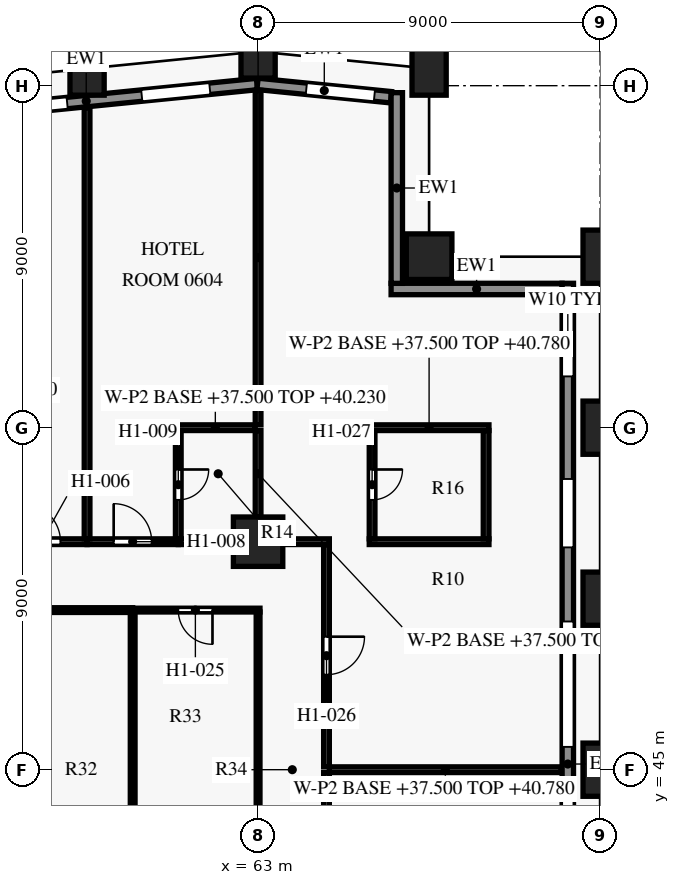
"""IFC4 building model, lengths in metres.
Left out: names, types, materials, properties, quantities, classifications, styles, units other than length and angle.
Written with IfcOpenShell. Run it as: python <this file> out.ifc"""

import sys

from ifc_helpers import new_model, si_unit, direction, frame, frame_2d, origin, origin_2d, place, context, subcontext, project, spatial, rectangle, extrude, element, fill, save


model = new_model("IFC4")
c1 = context("Model", 3, precision=1e-05, world=origin(), true_north=direction((0.0, 1.0)))
c2 = subcontext(c1, "Body", "Model", "MODEL_VIEW")
j1 = project(units=[si_unit("LENGTHUNIT", "METRE"), si_unit("PLANEANGLEUNIT", "RADIAN")], contexts=[c1])
p1 = place(None, origin())
s1 = spatial("IfcSite", under=j1, at=p1, CompositionType="ELEMENT")
p2 = place(p1, origin())
s2 = spatial("IfcBuilding", under=s1, at=p2, CompositionType="ELEMENT")
p3 = place(p2, frame((0.0, 0.0, 37.5)))
s3 = spatial("IfcBuildingStorey", under=s2, at=p3, CompositionType="ELEMENT", Elevation=37.5)
for number, where, z_axis, x_axis in (
    (1, (72.0, 45.0, 0.0), (0.0, 0.0, 1.0), (0.0, 1.0, 0.0)),
    (2, (72.0, 49.5, 0.0), (0.0, 0.0, 1.0), (0.0, 1.0, 0.0)),
    (3, (72.0, 54.0, 0.0), (0.0, 0.0, 1.0), (0.0, 1.0, 0.0)),
    (4, (72.0, 58.5, 0.0), (0.0, 0.0, 1.0), (0.0, 1.0, 0.0)),
    (5, (67.5, 63.45, 0.0), (0.0, 0.0, 1.0), (-0.995, 0.1, 0.0)),
    (6, (63.0, 63.9, 0.0), (0.0, 0.0, 1.0), (-1.0, 0.0, 0.0)),
    (7, (58.5, 63.45, 0.0), (0.0, 0.0, 1.0), (-0.995, -0.1, 0.0)),
):
    element("IfcColumn", number, at=place(p3, frame(where, z_axis=z_axis, x_axis=x_axis)), inside=s3, PredefinedType="COLUMN", context=c2, shape_type="SweptSolid", body=[
        extrude(rectangle(XDim=0.9, YDim=1.4, at=origin_2d()), origin(), (0.0, 0.0, 1.0), 3.6),
    ])
p4 = place(p3, frame((67.5, 58.5, 0.0), z_axis=(0.0, 0.0, 1.0), x_axis=(1.0, 0.0, 0.0)))
e8 = element("IfcColumn", 8, at=p4, inside=s3, PredefinedType="COLUMN", context=c2, shape_type="SweptSolid", body=[
    extrude(rectangle(XDim=1.2, YDim=1.2, at=origin_2d()), origin(), (0.0, 0.0, 1.0), 3.6),
])
p5 = place(p3, frame((63.0, 51.0, 0.0), z_axis=(0.0, 0.0, 1.0), x_axis=(1.0, 0.0, 0.0)))
e9 = element("IfcColumn", 9, at=p5, inside=s3, PredefinedType="COLUMN", context=c2, shape_type="SweptSolid", body=[
    extrude(rectangle(XDim=1.3, YDim=1.3, at=origin_2d()), origin(), (0.0, 0.0, 1.0), 3.6),
])
p6 = place(p3, frame((71.15, 57.8, 0.0), z_axis=(0.0, 0.0, 1.0), x_axis=(0.0, -1.0, 0.0)))
e10 = element("IfcWall", 10, at=p6, inside=s3, PredefinedType="SOLIDWALL", context=c2, shape_type="SweptSolid", body=[
    extrude(rectangle(XDim=25.302, YDim=0.3, at=frame_2d((12.651, 0.0))), origin(), (0.0, 0.0, 1.0), 2.95),
])
p7 = place(p6, frame((0.65, 0.0, 0.75)))
e11 = element("IfcOpeningElement", 11, at=p7, cuts=e10, PredefinedType="OPENING", context=c2, shape_type="SweptSolid", body=[
    extrude(rectangle(XDim=1.8, YDim=1.8, at=frame_2d((0.9, 0.9))), frame((0.0, 0.16, 0.0), z_axis=(0.0, -1.0, 0.0), x_axis=(1.0, 0.0, 0.0)), (0.0, 0.0, 1.0), 0.32),
])
p8 = place(p6, frame((5.15, 0.0, 0.75)))
e12 = element("IfcOpeningElement", 12, at=p8, cuts=e10, PredefinedType="OPENING", context=c2, shape_type="SweptSolid", body=[
    extrude(rectangle(XDim=1.8, YDim=1.8, at=frame_2d((0.9, 0.9))), frame((0.0, 0.16, 0.0), z_axis=(0.0, -1.0, 0.0), x_axis=(1.0, 0.0, 0.0)), (0.0, 0.0, 1.0), 0.32),
])
p9 = place(p6, frame((8.9, 0.0, 0.15)))
e13 = element("IfcOpeningElement", 13, at=p9, cuts=e10, PredefinedType="OPENING", context=c2, shape_type="SweptSolid", body=[
    extrude(rectangle(XDim=3.3, YDim=2.4, at=frame_2d((1.65, 1.2))), frame((0.0, 0.16, 0.0), z_axis=(0.0, -1.0, 0.0), x_axis=(1.0, 0.0, 0.0)), (0.0, 0.0, 1.0), 0.32),
])
p10 = place(p6, frame((13.4, 0.0, 0.15)))
e14 = element("IfcOpeningElement", 14, at=p10, cuts=e10, PredefinedType="OPENING", context=c2, shape_type="SweptSolid", body=[
    extrude(rectangle(XDim=3.3, YDim=2.4, at=frame_2d((1.65, 1.2))), frame((0.0, 0.16, 0.0), z_axis=(0.0, -1.0, 0.0), x_axis=(1.0, 0.0, 0.0)), (0.0, 0.0, 1.0), 0.32),
])
p11 = place(p6, frame((18.65, 0.0, 0.75)))
e15 = element("IfcOpeningElement", 15, at=p11, cuts=e10, PredefinedType="OPENING", context=c2, shape_type="SweptSolid", body=[
    extrude(rectangle(XDim=1.8, YDim=1.8, at=frame_2d((0.9, 0.9))), frame((0.0, 0.16, 0.0), z_axis=(0.0, -1.0, 0.0), x_axis=(1.0, 0.0, 0.0)), (0.0, 0.0, 1.0), 0.32),
])
p12 = place(p6, frame((23.15, 0.0, 0.75)))
e16 = element("IfcOpeningElement", 16, at=p12, cuts=e10, PredefinedType="OPENING", context=c2, shape_type="SweptSolid", body=[
    extrude(rectangle(XDim=1.8, YDim=1.8, at=frame_2d((0.9, 0.9))), frame((0.0, 0.16, 0.0), z_axis=(0.0, -1.0, 0.0), x_axis=(1.0, 0.0, 0.0)), (0.0, 0.0, 1.0), 0.32),
])
p13 = place(p3, frame((66.5, 57.65, 0.0), z_axis=(0.0, 0.0, 1.0), x_axis=(1.0, 0.0, 0.0)))
e17 = element("IfcWall", 17, at=p13, inside=s3, PredefinedType="SOLIDWALL", context=c2, shape_type="SweptSolid", body=[
    extrude(rectangle(XDim=4.5, YDim=0.3, at=frame_2d((2.25, 0.0))), origin(), (0.0, 0.0, 1.0), 2.95),
])
p14 = place(p3, frame((66.65, 62.816, 0.0), z_axis=(0.0, 0.0, 1.0), x_axis=(0.0, -1.0, 0.0)))
e18 = element("IfcWall", 18, at=p14, inside=s3, PredefinedType="SOLIDWALL", context=c2, shape_type="SweptSolid", body=[
    extrude(rectangle(XDim=5.018, YDim=0.3, at=frame_2d((2.509, 0.0))), origin(), (0.0, 0.0, 1.0), 2.95),
])
p15 = place(p3, frame((62.985, 63.047, 0.0), z_axis=(0.0, 0.0, 1.0), x_axis=(0.995031712439, -0.099558481511, 0.0)))
e19 = element("IfcWall", 19, at=p15, inside=s3, PredefinedType="SOLIDWALL", context=c2, shape_type="SweptSolid", body=[
    extrude(rectangle(XDim=3.531, YDim=0.3, at=frame_2d((1.766, 0.0))), origin(), (0.0, 0.0, 1.0), 2.95),
])
p16 = place(p15, frame((1.291, 0.0, 0.75)))
e20 = element("IfcOpeningElement", 20, at=p16, cuts=e19, PredefinedType="OPENING", context=c2, shape_type="SweptSolid", body=[
    extrude(rectangle(XDim=1.8, YDim=1.8, at=frame_2d((0.9, 0.9))), frame((0.0, 0.16, 0.0), z_axis=(0.0, -1.0, 0.0), x_axis=(1.0, 0.0, 0.0)), (0.0, 0.0, 1.0), 0.32),
])
p17 = place(p3, frame((53.985, 62.144, 0.0), z_axis=(0.0, 0.0, 1.0), x_axis=(0.995037993253, 0.099495688264, 0.0)))
e21 = element("IfcWall", 21, at=p17, inside=s3, PredefinedType="SOLIDWALL", context=c2, shape_type="SweptSolid", body=[
    extrude(rectangle(XDim=9.03, YDim=0.3, at=frame_2d((4.515, 0.0))), origin(), (0.0, 0.0, 1.0), 2.95),
])
p18 = place(p17, frame((0.711, 0.0, 0.15)))
e22 = element("IfcOpeningElement", 22, at=p18, cuts=e21, PredefinedType="OPENING", context=c2, shape_type="SweptSolid", body=[
    extrude(rectangle(XDim=3.3, YDim=2.4, at=frame_2d((1.65, 1.2))), frame((0.0, 0.16, 0.0), z_axis=(0.0, -1.0, 0.0), x_axis=(1.0, 0.0, 0.0)), (0.0, 0.0, 1.0), 0.32),
])
p19 = place(p17, frame((5.984, 0.0, 0.75)))
e23 = element("IfcOpeningElement", 23, at=p19, cuts=e21, PredefinedType="OPENING", context=c2, shape_type="SweptSolid", body=[
    extrude(rectangle(XDim=1.8, YDim=1.8, at=frame_2d((0.9, 0.9))), frame((0.0, 0.16, 0.0), z_axis=(0.0, -1.0, 0.0), x_axis=(1.0, 0.0, 0.0)), (0.0, 0.0, 1.0), 0.32),
])
p20 = place(p3, frame((63.0, 40.85, 0.0), z_axis=(0.0, 0.0, 1.0), x_axis=(0.0, 1.0, 0.0)))
e24 = element("IfcWall", 24, at=p20, inside=s3, PredefinedType="PARTITIONING", context=c2, shape_type="SweptSolid", body=[
    extrude(rectangle(XDim=8.3, YDim=0.1, at=frame_2d((4.15, 0.0))), origin(), (0.0, 0.0, 1.0), 2.73),
])
p21 = place(p3, frame((64.8, 44.925, 0.0), z_axis=(0.0, 0.0, 1.0), x_axis=(0.0, -1.0, 0.0)))
e25 = element("IfcWall", 25, at=p21, inside=s3, PredefinedType="PARTITIONING", context=c2, shape_type="SweptSolid", body=[
    extrude(rectangle(XDim=5.85, YDim=0.15, at=frame_2d((2.925, 0.0))), origin(), (0.0, 0.0, 1.0), 2.58),
])
p22 = place(p21, frame((2.425, 0.0, 0.0)))
e26 = element("IfcOpeningElement", 26, at=p22, cuts=e25, PredefinedType="OPENING", context=c2, shape_type="SweptSolid", body=[
    extrude(rectangle(XDim=1.0, YDim=2.1, at=frame_2d((0.5, 1.05))), frame((0.0, 0.085, 0.0), z_axis=(0.0, -1.0, 0.0), x_axis=(1.0, 0.0, 0.0)), (0.0, 0.0, 1.0), 0.17),
])
p23 = place(p3, frame((70.98, 45.0, 0.0), z_axis=(0.0, 0.0, 1.0), x_axis=(-1.0, 0.0, 0.0)))
e27 = element("IfcWall", 27, at=p23, inside=s3, PredefinedType="PARTITIONING", context=c2, shape_type="SweptSolid", body=[
    extrude(rectangle(XDim=6.105, YDim=0.15, at=frame_2d((3.052, 0.0))), origin(), (0.0, 0.0, 1.0), 3.28),
])
p24 = place(p3, frame((59.7, 49.137, 0.0), z_axis=(0.0, 0.0, 1.0), x_axis=(0.0, -1.0, 0.0)))
e28 = element("IfcWall", 28, at=p24, inside=s3, PredefinedType="PARTITIONING", context=c2, shape_type="SweptSolid", body=[
    extrude(rectangle(XDim=8.275, YDim=0.125, at=frame_2d((4.137, 0.0))), origin(), (0.0, 0.0, 1.0), 3.28),
])
p25 = place(p3, frame((59.7, 49.2, 0.0), z_axis=(0.0, 0.0, 1.0), x_axis=(-1.0, 0.0, 0.0)))
e29 = element("IfcWall", 29, at=p25, inside=s3, PredefinedType="PARTITIONING", context=c2, shape_type="SweptSolid", body=[
    extrude(rectangle(XDim=2.7, YDim=0.125, at=frame_2d((1.35, 0.0))), origin(), (0.0, 0.0, 1.0), 3.28),
])
p26 = place(p3, frame((63.05, 49.2, 0.0), z_axis=(0.0, 0.0, 1.0), x_axis=(-1.0, 0.0, 0.0)))
e30 = element("IfcWall", 30, at=p26, inside=s3, PredefinedType="PARTITIONING", context=c2, shape_type="SweptSolid", body=[
    extrude(rectangle(XDim=3.35, YDim=0.1, at=frame_2d((1.675, 0.0))), origin(), (0.0, 0.0, 1.0), 2.73),
])
p27 = place(p26, frame((1.25, 0.0, 0.0)))
e31 = element("IfcOpeningElement", 31, at=p27, cuts=e30, PredefinedType="OPENING", context=c2, shape_type="SweptSolid", body=[
    extrude(rectangle(XDim=0.9, YDim=2.1, at=frame_2d((0.45, 1.05))), frame((0.0, 0.06, 0.0), z_axis=(0.0, -1.0, 0.0), x_axis=(1.0, 0.0, 0.0)), (0.0, 0.0, 1.0), 0.12),
])
p28 = place(p3, frame((64.8, 50.925, 0.0), z_axis=(0.0, 0.0, 1.0), x_axis=(0.0, -1.0, 0.0)))
e32 = element("IfcWall", 32, at=p28, inside=s3, PredefinedType="PARTITIONING", context=c2, shape_type="SweptSolid", body=[
    extrude(rectangle(XDim=5.85, YDim=0.15, at=frame_2d((2.925, 0.0))), origin(), (0.0, 0.0, 1.0), 2.58),
])
p29 = place(p28, frame((2.425, 0.0, 0.0)))
e33 = element("IfcOpeningElement", 33, at=p29, cuts=e32, PredefinedType="OPENING", context=c2, shape_type="SweptSolid", body=[
    extrude(rectangle(XDim=1.0, YDim=2.1, at=frame_2d((0.5, 1.05))), frame((0.0, 0.085, 0.0), z_axis=(0.0, -1.0, 0.0), x_axis=(1.0, 0.0, 0.0)), (0.0, 0.0, 1.0), 0.17),
])
p30 = place(p3, frame((56.1, 51.0, 0.0), z_axis=(0.0, 0.0, 1.0), x_axis=(1.0, 0.0, 0.0)))
e34 = element("IfcWall", 34, at=p30, inside=s3, PredefinedType="PARTITIONING", context=c2, shape_type="SweptSolid", body=[
    extrude(rectangle(XDim=2.4, YDim=0.15, at=frame_2d((1.2, 0.0))), origin(), (0.0, 0.0, 1.0), 2.58),
])
p31 = place(p30, frame((0.7, 0.0, 0.0)))
e35 = element("IfcOpeningElement", 35, at=p31, cuts=e34, PredefinedType="OPENING", context=c2, shape_type="SweptSolid", body=[
    extrude(rectangle(XDim=1.0, YDim=2.1, at=frame_2d((0.5, 1.05))), frame((0.0, 0.085, 0.0), z_axis=(0.0, -1.0, 0.0), x_axis=(1.0, 0.0, 0.0)), (0.0, 0.0, 1.0), 0.17),
])
p32 = place(p3, frame((58.5, 51.0, 0.0), z_axis=(0.0, 0.0, 1.0), x_axis=(1.0, 0.0, 0.0)))
e36 = element("IfcWall", 36, at=p32, inside=s3, PredefinedType="PARTITIONING", context=c2, shape_type="SweptSolid", body=[
    extrude(rectangle(XDim=2.4, YDim=0.15, at=frame_2d((1.2, 0.0))), origin(), (0.0, 0.0, 1.0), 2.58),
])
p33 = place(p32, frame((0.7, 0.0, 0.0)))
e37 = element("IfcOpeningElement", 37, at=p33, cuts=e36, PredefinedType="OPENING", context=c2, shape_type="SweptSolid", body=[
    extrude(rectangle(XDim=1.0, YDim=2.1, at=frame_2d((0.5, 1.05))), frame((0.0, 0.085, 0.0), z_axis=(0.0, -1.0, 0.0), x_axis=(1.0, 0.0, 0.0)), (0.0, 0.0, 1.0), 0.17),
])
p34 = place(p3, frame((60.9, 51.0, 0.0), z_axis=(0.0, 0.0, 1.0), x_axis=(1.0, 0.0, 0.0)))
e38 = element("IfcWall", 38, at=p34, inside=s3, PredefinedType="PARTITIONING", context=c2, shape_type="SweptSolid", body=[
    extrude(rectangle(XDim=1.445, YDim=0.15, at=frame_2d((0.723, 0.0))), origin(), (0.0, 0.0, 1.0), 2.58),
])
p35 = place(p3, frame((63.655, 51.0, 0.0), z_axis=(0.0, 0.0, 1.0), x_axis=(1.0, 0.0, 0.0)))
e39 = element("IfcWall", 39, at=p35, inside=s3, PredefinedType="PARTITIONING", context=c2, shape_type="SweptSolid", body=[
    extrude(rectangle(XDim=1.22, YDim=0.15, at=frame_2d((0.61, 0.0))), origin(), (0.0, 0.0, 1.0), 2.58),
])
p36 = place(p3, frame((65.925, 51.0, 0.0), z_axis=(0.0, 0.0, 1.0), x_axis=(1.0, 0.0, 0.0)))
e40 = element("IfcWall", 40, at=p36, inside=s3, PredefinedType="PARTITIONING", context=c2, shape_type="SweptSolid", body=[
    extrude(rectangle(XDim=3.15, YDim=0.15, at=frame_2d((1.575, 0.0))), origin(), (0.0, 0.0, 1.0), 2.58),
])
p37 = place(p3, frame((69.0, 51.075, 0.0), z_axis=(0.0, 0.0, 1.0), x_axis=(0.0, 1.0, 0.0)))
e41 = element("IfcWall", 41, at=p37, inside=s3, PredefinedType="PARTITIONING", context=c2, shape_type="SweptSolid", body=[
    extrude(rectangle(XDim=2.85, YDim=0.15, at=frame_2d((1.425, 0.0))), origin(), (0.0, 0.0, 1.0), 2.58),
])
p38 = place(p3, frame((60.9, 53.925, 0.0), z_axis=(0.0, 0.0, 1.0), x_axis=(0.0, -1.0, 0.0)))
e42 = element("IfcWall", 42, at=p38, inside=s3, PredefinedType="PARTITIONING", context=c2, shape_type="SweptSolid", body=[
    extrude(rectangle(XDim=2.85, YDim=0.15, at=frame_2d((1.425, 0.0))), origin(), (0.0, 0.0, 1.0), 2.58),
])
p39 = place(p38, frame((1.025, 0.0, 0.0)))
e43 = element("IfcOpeningElement", 43, at=p39, cuts=e42, PredefinedType="OPENING", context=c2, shape_type="SweptSolid", body=[
    extrude(rectangle(XDim=0.8, YDim=2.1, at=frame_2d((0.4, 1.05))), frame((0.0, 0.085, 0.0), z_axis=(0.0, -1.0, 0.0), x_axis=(1.0, 0.0, 0.0)), (0.0, 0.0, 1.0), 0.17),
])
p40 = place(p3, frame((63.0, 53.925, 0.0), z_axis=(0.0, 0.0, 1.0), x_axis=(0.0, -1.0, 0.0)))
e44 = element("IfcWall", 44, at=p40, inside=s3, PredefinedType="PARTITIONING", context=c2, shape_type="SweptSolid", body=[
    extrude(rectangle(XDim=2.27, YDim=0.15, at=frame_2d((1.135, 0.0))), origin(), (0.0, 0.0, 1.0), 2.73),
])
p41 = place(p3, frame((66.0, 53.925, 0.0), z_axis=(0.0, 0.0, 1.0), x_axis=(0.0, -1.0, 0.0)))
e45 = element("IfcWall", 45, at=p41, inside=s3, PredefinedType="PARTITIONING", context=c2, shape_type="SweptSolid", body=[
    extrude(rectangle(XDim=2.85, YDim=0.15, at=frame_2d((1.425, 0.0))), origin(), (0.0, 0.0, 1.0), 2.58),
])
p42 = place(p41, frame((1.025, 0.0, 0.0)))
e46 = element("IfcOpeningElement", 46, at=p42, cuts=e45, PredefinedType="OPENING", context=c2, shape_type="SweptSolid", body=[
    extrude(rectangle(XDim=0.8, YDim=2.1, at=frame_2d((0.4, 1.05))), frame((0.0, 0.085, 0.0), z_axis=(0.0, -1.0, 0.0), x_axis=(1.0, 0.0, 0.0)), (0.0, 0.0, 1.0), 0.17),
])
p43 = place(p3, frame((62.925, 54.0, 0.0), z_axis=(0.0, 0.0, 1.0), x_axis=(-1.0, 0.0, 0.0)))
e47 = element("IfcWall", 47, at=p43, inside=s3, PredefinedType="PARTITIONING", context=c2, shape_type="SweptSolid", body=[
    extrude(rectangle(XDim=2.1, YDim=0.15, at=frame_2d((1.05, 0.0))), origin(), (0.0, 0.0, 1.0), 2.73),
])
p44 = place(p3, frame((69.075, 54.0, 0.0), z_axis=(0.0, 0.0, 1.0), x_axis=(-1.0, 0.0, 0.0)))
e48 = element("IfcWall", 48, at=p44, inside=s3, PredefinedType="PARTITIONING", context=c2, shape_type="SweptSolid", body=[
    extrude(rectangle(XDim=3.15, YDim=0.15, at=frame_2d((1.575, 0.0))), origin(), (0.0, 0.0, 1.0), 3.28),
])
p45 = place(p3, frame((58.5, 62.425, 0.0), z_axis=(0.0, 0.0, 1.0), x_axis=(0.0, -1.0, 0.0)))
e49 = element("IfcWall", 49, at=p45, inside=s3, PredefinedType="PARTITIONING", context=c2, shape_type="SweptSolid", body=[
    extrude(rectangle(XDim=11.35, YDim=0.15, at=frame_2d((5.675, 0.0))), origin(), (0.0, 0.0, 1.0), 2.58),
])
p46 = place(p3, frame((63.0, 62.875, 0.0), z_axis=(0.0, 0.0, 1.0), x_axis=(0.0, -1.0, 0.0)))
e50 = element("IfcWall", 50, at=p46, inside=s3, PredefinedType="PARTITIONING", context=c2, shape_type="SweptSolid", body=[
    extrude(rectangle(XDim=8.8, YDim=0.15, at=frame_2d((4.4, 0.0))), origin(), (0.0, 0.0, 1.0), 2.73),
])
p47 = place(p7, origin())
e51 = element("IfcWindow", 51, at=p47, inside=s3, PartitioningType="SINGLE_PANEL", PredefinedType="WINDOW", context=c2, shape_type="SweptSolid", body=[
    extrude(rectangle(XDim=1.8, YDim=1.8, at=frame_2d((0.9, 0.9))), frame((0.0, 0.03, 0.0), z_axis=(0.0, -1.0, 0.0), x_axis=(1.0, 0.0, 0.0)), (0.0, 0.0, 1.0), 0.06),
])
fill(e11, e51)
p48 = place(p8, origin())
e52 = element("IfcWindow", 52, at=p48, inside=s3, PartitioningType="SINGLE_PANEL", PredefinedType="WINDOW", context=c2, shape_type="SweptSolid", body=[
    extrude(rectangle(XDim=1.8, YDim=1.8, at=frame_2d((0.9, 0.9))), frame((0.0, 0.03, 0.0), z_axis=(0.0, -1.0, 0.0), x_axis=(1.0, 0.0, 0.0)), (0.0, 0.0, 1.0), 0.06),
])
fill(e12, e52)
p49 = place(p9, origin())
e53 = element("IfcWindow", 53, at=p49, inside=s3, PartitioningType="SINGLE_PANEL", PredefinedType="WINDOW", context=c2, shape_type="SweptSolid", body=[
    extrude(rectangle(XDim=3.3, YDim=2.4, at=frame_2d((1.65, 1.2))), frame((0.0, 0.03, 0.0), z_axis=(0.0, -1.0, 0.0), x_axis=(1.0, 0.0, 0.0)), (0.0, 0.0, 1.0), 0.06),
])
fill(e13, e53)
p50 = place(p10, origin())
e54 = element("IfcWindow", 54, at=p50, inside=s3, PartitioningType="SINGLE_PANEL", PredefinedType="WINDOW", context=c2, shape_type="SweptSolid", body=[
    extrude(rectangle(XDim=3.3, YDim=2.4, at=frame_2d((1.65, 1.2))), frame((0.0, 0.03, 0.0), z_axis=(0.0, -1.0, 0.0), x_axis=(1.0, 0.0, 0.0)), (0.0, 0.0, 1.0), 0.06),
])
fill(e14, e54)
p51 = place(p16, origin())
e55 = element("IfcWindow", 55, at=p51, inside=s3, PartitioningType="SINGLE_PANEL", PredefinedType="WINDOW", context=c2, shape_type="SweptSolid", body=[
    extrude(rectangle(XDim=1.8, YDim=1.8, at=frame_2d((0.9, 0.9))), frame((0.0, 0.03, 0.0), z_axis=(0.0, -1.0, 0.0), x_axis=(1.0, 0.0, 0.0)), (0.0, 0.0, 1.0), 0.06),
])
fill(e20, e55)
p52 = place(p18, origin())
e56 = element("IfcWindow", 56, at=p52, inside=s3, PartitioningType="SINGLE_PANEL", PredefinedType="WINDOW", context=c2, shape_type="SweptSolid", body=[
    extrude(rectangle(XDim=3.3, YDim=2.4, at=frame_2d((1.65, 1.2))), frame((0.0, 0.03, 0.0), z_axis=(0.0, -1.0, 0.0), x_axis=(1.0, 0.0, 0.0)), (0.0, 0.0, 1.0), 0.06),
])
fill(e22, e56)
p53 = place(p19, origin())
e57 = element("IfcWindow", 57, at=p53, inside=s3, PartitioningType="SINGLE_PANEL", PredefinedType="WINDOW", context=c2, shape_type="SweptSolid", body=[
    extrude(rectangle(XDim=1.8, YDim=1.8, at=frame_2d((0.9, 0.9))), frame((0.0, 0.03, 0.0), z_axis=(0.0, -1.0, 0.0), x_axis=(1.0, 0.0, 0.0)), (0.0, 0.0, 1.0), 0.06),
])
fill(e23, e57)
p54 = place(p31, origin())
e58 = element("IfcDoor", 58, at=p54, inside=s3, OperationType="SINGLE_SWING_LEFT", PredefinedType="DOOR", context=c2, shape_type="SweptSolid", body=[
    extrude(rectangle(XDim=1.0, YDim=2.1, at=frame_2d((0.5, 1.05))), frame((0.0, 0.025, 0.0), z_axis=(0.0, -1.0, 0.0), x_axis=(1.0, 0.0, 0.0)), (0.0, 0.0, 1.0), 0.05),
])
fill(e35, e58)
p55 = place(p33, origin())
e59 = element("IfcDoor", 59, at=p55, inside=s3, OperationType="SINGLE_SWING_LEFT", PredefinedType="DOOR", context=c2, shape_type="SweptSolid", body=[
    extrude(rectangle(XDim=1.0, YDim=2.1, at=frame_2d((0.5, 1.05))), frame((0.0, 0.025, 0.0), z_axis=(0.0, -1.0, 0.0), x_axis=(1.0, 0.0, 0.0)), (0.0, 0.0, 1.0), 0.05),
])
fill(e37, e59)
p56 = place(p39, origin())
e60 = element("IfcDoor", 60, at=p56, inside=s3, OperationType="SINGLE_SWING_LEFT", PredefinedType="DOOR", context=c2, shape_type="SweptSolid", body=[
    extrude(rectangle(XDim=0.8, YDim=2.1, at=frame_2d((0.4, 1.05))), frame((0.0, 0.025, 0.0), z_axis=(0.0, -1.0, 0.0), x_axis=(1.0, 0.0, 0.0)), (0.0, 0.0, 1.0), 0.05),
])
fill(e43, e60)
p57 = place(p27, origin())
e61 = element("IfcDoor", 61, at=p57, inside=s3, OperationType="SINGLE_SWING_LEFT", PredefinedType="DOOR", context=c2, shape_type="SweptSolid", body=[
    extrude(rectangle(XDim=0.9, YDim=2.1, at=frame_2d((0.45, 1.05))), frame((0.0, 0.025, 0.0), z_axis=(0.0, -1.0, 0.0), x_axis=(1.0, 0.0, 0.0)), (0.0, 0.0, 1.0), 0.05),
])
fill(e31, e61)
p58 = place(p29, origin())
e62 = element("IfcDoor", 62, at=p58, inside=s3, OperationType="SINGLE_SWING_LEFT", PredefinedType="DOOR", context=c2, shape_type="SweptSolid", body=[
    extrude(rectangle(XDim=1.0, YDim=2.1, at=frame_2d((0.5, 1.05))), frame((0.0, 0.025, 0.0), z_axis=(0.0, -1.0, 0.0), x_axis=(1.0, 0.0, 0.0)), (0.0, 0.0, 1.0), 0.05),
])
fill(e33, e62)
p59 = place(p42, origin())
e63 = element("IfcDoor", 63, at=p59, inside=s3, OperationType="SINGLE_SWING_RIGHT", PredefinedType="DOOR", context=c2, shape_type="SweptSolid", body=[
    extrude(rectangle(XDim=0.8, YDim=2.1, at=frame_2d((0.4, 1.05))), frame((0.0, 0.025, 0.0), z_axis=(0.0, -1.0, 0.0), x_axis=(1.0, 0.0, 0.0)), (0.0, 0.0, 1.0), 0.05),
])
fill(e46, e63)
save(model, sys.argv[1])
